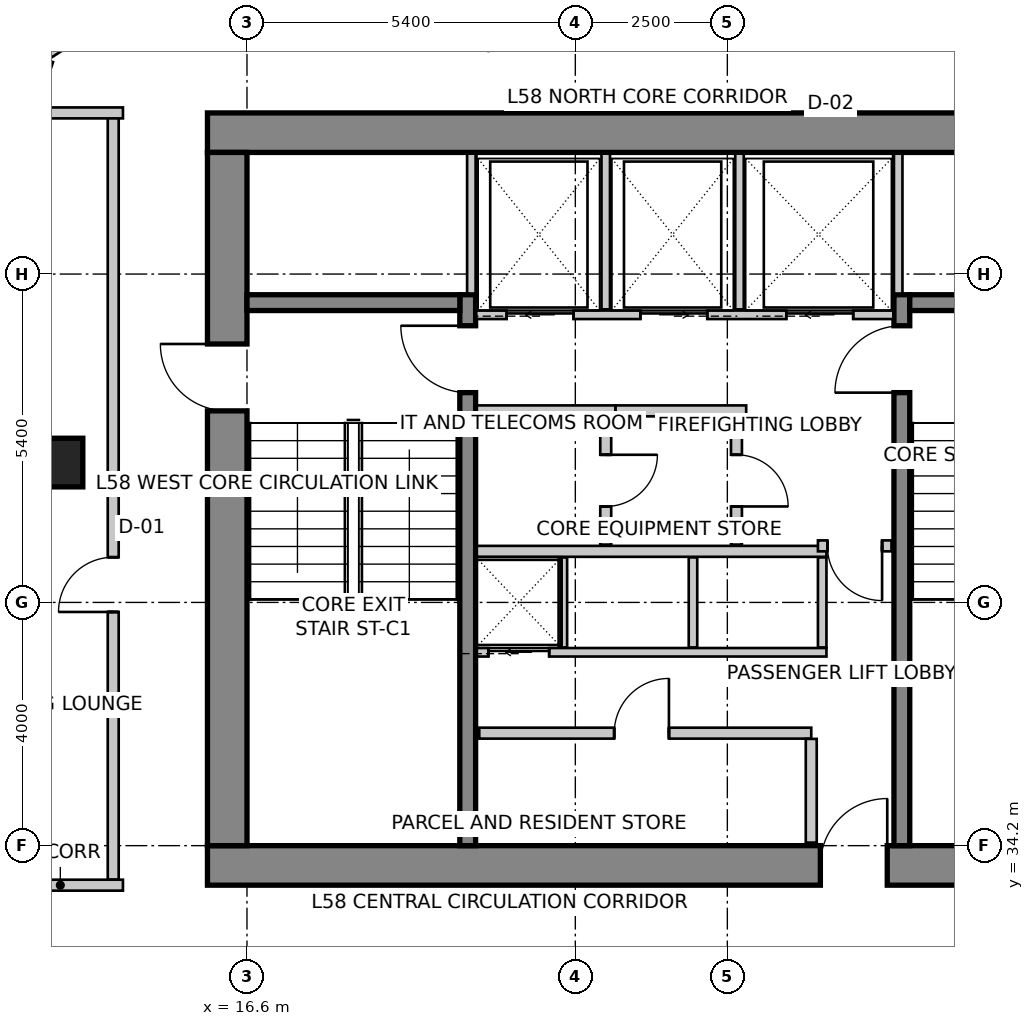
"""IFC4 building model, lengths in metres.
Left out: names, types, materials, properties, quantities, classifications, styles, units other than length and angle.
Written with IfcOpenShell. Run it as: python <this file> out.ifc"""

import sys

from ifc_helpers import new_model, si_unit, direction, frame, frame_2d, origin, origin_2d, place, context, subcontext, project, spatial, rectangle, extrude, source, transform, mapped, element, fill, save


model = new_model("IFC4")
c1 = context("Model", 3, precision=1e-05, world=origin(), true_north=direction((0.0, 1.0)))
c2 = subcontext(c1, "Body", "Model", "MODEL_VIEW")
j1 = project(units=[si_unit("LENGTHUNIT", "METRE"), si_unit("PLANEANGLEUNIT", "RADIAN")], contexts=[c1])
p1 = place(None, origin())
s1 = spatial("IfcSite", under=j1, at=p1, CompositionType="ELEMENT")
p2 = place(p1, origin())
s2 = spatial("IfcBuilding", under=s1, at=p2, CompositionType="ELEMENT")
p3 = place(p2, frame((0.0, 0.0, 228.9)))
s3 = spatial("IfcBuildingStorey", under=s2, at=p3, CompositionType="ELEMENT", Elevation=228.9)
p4 = place(p3, frame((15.95, 45.925, 0.0), z_axis=(0.0, 0.0, 1.0), x_axis=(1.0, 0.0, 0.0)))
e1 = element("IfcWall", 1, at=p4, inside=s3, PredefinedType="SHEAR", context=c2, shape_type="SweptSolid", body=[
    extrude(rectangle(XDim=15.7, YDim=0.65, at=frame_2d((7.85, 0.0))), origin(), (0.0, 0.0, 1.0), 3.5),
])
p5 = place(p3, frame((15.95, 33.875, 0.0), z_axis=(0.0, 0.0, 1.0), x_axis=(1.0, 0.0, 0.0)))
e2 = element("IfcWall", 2, at=p5, inside=s3, PredefinedType="SHEAR", context=c2, shape_type="SweptSolid", body=[
    extrude(rectangle(XDim=15.7, YDim=0.65, at=frame_2d((7.85, 0.0))), origin(), (0.0, 0.0, 1.0), 3.5),
])
m1 = source(origin(), c2, "Body", "SweptSolid", [
    extrude(rectangle(XDim=1.1, YDim=2.15, at=frame_2d((0.55, 1.075))), frame((0.0, 0.335, 0.0), z_axis=(0.0, -1.0, 0.0), x_axis=(1.0, 0.0, 0.0)), (0.0, 0.0, 1.0), 0.67),
])
p6 = place(p5, frame((10.08, 0.0, 0.0)))
e3 = element("IfcOpeningElement", 3, at=p6, cuts=e2, PredefinedType="OPENING", context=c2, shape_type="MappedRepresentation", body=[
    mapped(m1, transform((0.0, 0.0, 0.0), scale=1.0)),
])
p7 = place(p3, frame((16.275, 34.2, 0.0), z_axis=(0.0, 0.0, 1.0), x_axis=(0.0, 1.0, 0.0)))
e4 = element("IfcWall", 4, at=p7, inside=s3, PredefinedType="SHEAR", context=c2, shape_type="SweptSolid", body=[
    extrude(rectangle(XDim=11.4, YDim=0.65, at=frame_2d((5.7, 0.0))), origin(), (0.0, 0.0, 1.0), 3.5),
])
p8 = place(p7, frame((7.15, 0.0, 0.0)))
e5 = element("IfcOpeningElement", 5, at=p8, cuts=e4, PredefinedType="OPENING", context=c2, shape_type="MappedRepresentation", body=[
    mapped(m1, transform((0.0, 0.0, 0.0), scale=1.0)),
])
p9 = place(p3, frame((20.23, 34.2, 0.0), z_axis=(0.0, 0.0, 1.0), x_axis=(0.0, 1.0, 0.0)))
e6 = element("IfcWall", 6, at=p9, inside=s3, PredefinedType="SHEAR", context=c2, shape_type="SweptSolid", body=[
    extrude(rectangle(XDim=9.06, YDim=0.26, at=frame_2d((4.53, 0.0))), origin(), (0.0, 0.0, 1.0), 3.5),
])
m2 = source(origin(), c2, "Body", "SweptSolid", [
    extrude(rectangle(XDim=1.1, YDim=2.15, at=frame_2d((0.55, 1.075))), frame((0.0, 0.14, 0.0), z_axis=(0.0, -1.0, 0.0), x_axis=(1.0, 0.0, 0.0)), (0.0, 0.0, 1.0), 0.28),
])
p10 = place(p9, frame((7.45, 0.0, 0.0)))
e7 = element("IfcOpeningElement", 7, at=p10, cuts=e6, PredefinedType="OPENING", context=c2, shape_type="MappedRepresentation", body=[
    mapped(m2, transform((0.0, 0.0, 0.0), scale=1.0)),
])
p11 = place(p3, frame((27.37, 34.2, 0.0), z_axis=(0.0, 0.0, 1.0), x_axis=(0.0, 1.0, 0.0)))
e8 = element("IfcWall", 8, at=p11, inside=s3, PredefinedType="SHEAR", context=c2, shape_type="SweptSolid", body=[
    extrude(rectangle(XDim=9.06, YDim=0.26, at=frame_2d((4.53, 0.0))), origin(), (0.0, 0.0, 1.0), 3.5),
])
p12 = place(p11, frame((7.45, 0.0, 0.0)))
e9 = element("IfcOpeningElement", 9, at=p12, cuts=e8, PredefinedType="OPENING", context=c2, shape_type="MappedRepresentation", body=[
    mapped(m2, transform((0.0, 0.0, 0.0), scale=1.0)),
])
for number, where, z_axis, x_axis in (
    (10, (16.6, 43.13, 0.0), (0.0, 0.0, 1.0), (1.0, 0.0, 0.0)),
    (11, (27.5, 43.13, 0.0), (0.0, 0.0, 1.0), (1.0, 0.0, 0.0)),
):
    element("IfcWall", number, at=place(p3, frame(where, z_axis=z_axis, x_axis=x_axis)), inside=s3, PredefinedType="SHEAR", context=c2, shape_type="SweptSolid", body=[
        extrude(rectangle(XDim=3.5, YDim=0.26, at=frame_2d((1.75, 0.0))), origin(), (0.0, 0.0, 1.0), 3.5),
    ])
m3 = source(origin(), c2, "Body", "SweptSolid", [
    extrude(rectangle(XDim=0.8, YDim=0.8, at=origin_2d()), origin(), (0.0, 0.0, 1.0), 3.5),
])
p13 = place(p3, frame((13.5, 40.5, 0.0), z_axis=(0.0, 0.0, 1.0), x_axis=(1.0, 0.0, 0.0)))
e12 = element("IfcColumn", 12, at=p13, inside=s3, PredefinedType="COLUMN", context=c2, shape_type="MappedRepresentation", body=[
    mapped(m3, transform((0.0, 0.0, 0.0), scale=1.0)),
])
p14 = place(p3, frame((27.652, 30.892, 0.0), z_axis=(0.0, 0.0, 1.0), x_axis=(0.707106781187, 0.707106781187, 0.0)))
e13 = element("IfcWall", 13, at=p14, inside=s3, PredefinedType="SOLIDWALL", context=c2, shape_type="SweptSolid", body=[
    extrude(rectangle(XDim=2.907, YDim=0.3, at=frame_2d((1.454, 0.0))), origin(), (0.0, 0.0, 1.0), 3.25),
])
p15 = place(p3, frame((21.874, 52.742, 0.0), z_axis=(0.0, 0.0, 1.0), x_axis=(-0.84365659959, -0.536883173482, 0.0)))
e14 = element("IfcWall", 14, at=p15, inside=s3, PredefinedType="SOLIDWALL", context=c2, shape_type="SweptSolid", body=[
    extrude(rectangle(XDim=10.283, YDim=0.3, at=frame_2d((5.142, 0.0))), origin(), (0.0, 0.0, 1.0), 3.25),
])
m4 = source(origin(), c2, "Body", "SweptSolid", [
    extrude(rectangle(XDim=2.1, YDim=2.0, at=frame_2d((1.05, 1.0))), frame((0.0, 0.16, 0.0), z_axis=(0.0, -1.0, 0.0), x_axis=(1.0, 0.0, 0.0)), (0.0, 0.0, 1.0), 0.32),
])
p16 = place(p15, frame((3.457, 0.0, 0.85)))
e15 = element("IfcOpeningElement", 15, at=p16, cuts=e14, PredefinedType="OPENING", context=c2, shape_type="MappedRepresentation", body=[
    mapped(m4, transform((0.0, 0.0, 0.0), scale=1.0)),
])
p17 = place(p3, frame((13.269, 47.134, 0.0), z_axis=(0.0, 0.0, 1.0), x_axis=(-0.319920776449, -0.947444297464, 0.0)))
e16 = element("IfcWall", 16, at=p17, inside=s3, PredefinedType="SOLIDWALL", context=c2, shape_type="SweptSolid", body=[
    extrude(rectangle(XDim=16.133, YDim=0.3, at=frame_2d((8.067, 0.0))), origin(), (0.0, 0.0, 1.0), 3.25),
])
m5 = source(origin(), c2, "Body", "SweptSolid", [
    extrude(rectangle(XDim=2.4, YDim=2.2, at=frame_2d((1.2, 1.1))), frame((0.0, 0.16, 0.0), z_axis=(0.0, -1.0, 0.0), x_axis=(1.0, 0.0, 0.0)), (0.0, 0.0, 1.0), 0.32),
])
p18 = place(p17, frame((2.363, 0.0, 0.85)))
e17 = element("IfcOpeningElement", 17, at=p18, cuts=e16, PredefinedType="OPENING", context=c2, shape_type="MappedRepresentation", body=[
    mapped(m5, transform((0.0, 0.0, 0.0), scale=1.0)),
])
p19 = place(p17, frame((7.41, 0.0, 0.85)))
e18 = element("IfcOpeningElement", 18, at=p19, cuts=e16, PredefinedType="OPENING", context=c2, shape_type="MappedRepresentation", body=[
    mapped(m4, transform((0.0, 0.0, 0.0), scale=1.0)),
])
p20 = place(p17, frame((12.157, 0.0, 0.85)))
e19 = element("IfcOpeningElement", 19, at=p20, cuts=e16, PredefinedType="OPENING", context=c2, shape_type="MappedRepresentation", body=[
    mapped(m5, transform((0.0, 0.0, 0.0), scale=1.0)),
])
p21 = place(p3, frame((20.37, 42.93, 0.0), z_axis=(0.0, 0.0, 1.0), x_axis=(1.0, 0.0, 0.0)))
e20 = element("IfcWall", 20, at=p21, inside=s3, PredefinedType="SOLIDWALL", context=c2, shape_type="SweptSolid", body=[
    extrude(rectangle(XDim=6.86, YDim=0.14, at=frame_2d((3.43, 0.0))), origin(), (0.0, 0.0, 1.0), 3.25),
])
m6 = source(origin(), c2, "Body", "SweptSolid", [
    extrude(rectangle(XDim=1.1, YDim=2.15, at=frame_2d((0.55, 1.075))), frame((0.0, 0.08, 0.0), z_axis=(0.0, -1.0, 0.0), x_axis=(1.0, 0.0, 0.0)), (0.0, 0.0, 1.0), 0.16),
])
p22 = place(p21, frame((0.5, 0.0, 0.0)))
e21 = element("IfcOpeningElement", 21, at=p22, cuts=e20, PredefinedType="OPENING", context=c2, shape_type="MappedRepresentation", body=[
    mapped(m6, transform((0.0, 0.0, 0.0), scale=1.0)),
])
p23 = place(p21, frame((2.7, 0.0, 0.0)))
e22 = element("IfcOpeningElement", 22, at=p23, cuts=e20, PredefinedType="OPENING", context=c2, shape_type="MappedRepresentation", body=[
    mapped(m6, transform((0.0, 0.0, 0.0), scale=1.0)),
])
p24 = place(p21, frame((5.1, 0.0, 0.0)))
e23 = element("IfcOpeningElement", 23, at=p24, cuts=e20, PredefinedType="OPENING", context=c2, shape_type="MappedRepresentation", body=[
    mapped(m6, transform((0.0, 0.0, 0.0), scale=1.0)),
])
for number, where, z_axis, x_axis in (
    (24, (20.29, 43.28, 0.0), (0.0, 0.0, 1.0), (0.0, 1.0, 0.0)),
    (25, (27.31, 43.28, 0.0), (0.0, 0.0, 1.0), (0.0, 1.0, 0.0)),
):
    element("IfcWall", number, at=place(p3, frame(where, z_axis=z_axis, x_axis=x_axis)), inside=s3, PredefinedType="SOLIDWALL", context=c2, shape_type="SweptSolid", body=[
        extrude(rectangle(XDim=2.3, YDim=0.14, at=frame_2d((1.15, 0.0))), origin(), (0.0, 0.0, 1.0), 3.25),
    ])
for number, where, z_axis, x_axis in (
    (26, (22.5, 43.02, 0.0), (0.0, 0.0, 1.0), (0.0, 1.0, 0.0)),
    (27, (24.7, 43.02, 0.0), (0.0, 0.0, 1.0), (0.0, 1.0, 0.0)),
):
    element("IfcWall", number, at=place(p3, frame(where, z_axis=z_axis, x_axis=x_axis)), inside=s3, PredefinedType="SOLIDWALL", context=c2, shape_type="SweptSolid", body=[
        extrude(rectangle(XDim=2.56, YDim=0.14, at=frame_2d((1.28, 0.0))), origin(), (0.0, 0.0, 1.0), 3.25),
    ])
p25 = place(p3, frame((20.38, 37.38, 0.0), z_axis=(0.0, 0.0, 1.0), x_axis=(1.0, 0.0, 0.0)))
e28 = element("IfcWall", 28, at=p25, inside=s3, PredefinedType="SOLIDWALL", context=c2, shape_type="SweptSolid", body=[
    extrude(rectangle(XDim=5.75, YDim=0.14, at=frame_2d((2.875, 0.0))), origin(), (0.0, 0.0, 1.0), 3.25),
])
m7 = source(origin(), c2, "Body", "SweptSolid", [
    extrude(rectangle(XDim=1.0, YDim=2.15, at=frame_2d((0.5, 1.075))), frame((0.0, 0.08, 0.0), z_axis=(0.0, -1.0, 0.0), x_axis=(1.0, 0.0, 0.0)), (0.0, 0.0, 1.0), 0.16),
])
p26 = place(p25, frame((0.19, 0.0, 0.0)))
e29 = element("IfcOpeningElement", 29, at=p26, cuts=e28, PredefinedType="OPENING", context=c2, shape_type="MappedRepresentation", body=[
    mapped(m7, transform((0.0, 0.0, 0.0), scale=1.0)),
])
p27 = place(p3, frame((20.38, 39.04, 0.0), z_axis=(0.0, 0.0, 1.0), x_axis=(1.0, 0.0, 0.0)))
e30 = element("IfcWall", 30, at=p27, inside=s3, PredefinedType="SOLIDWALL", context=c2, shape_type="SweptSolid", body=[
    extrude(rectangle(XDim=5.75, YDim=0.18, at=frame_2d((2.875, 0.0))), origin(), (0.0, 0.0, 1.0), 3.25),
])
for number, where, z_axis, x_axis in (
    (31, (26.06, 37.46, 0.0), (0.0, 0.0, 1.0), (0.0, 1.0, 0.0)),
    (32, (21.795, 37.46, 0.0), (0.0, 0.0, 1.0), (0.0, 1.0, 0.0)),
    (33, (23.935, 37.46, 0.0), (0.0, 0.0, 1.0), (0.0, 1.0, 0.0)),
):
    element("IfcWall", number, at=place(p3, frame(where, z_axis=z_axis, x_axis=x_axis)), inside=s3, PredefinedType="SOLIDWALL", context=c2, shape_type="SweptSolid", body=[
        extrude(rectangle(XDim=1.48, YDim=0.14, at=frame_2d((0.74, 0.0))), origin(), (0.0, 0.0, 1.0), 3.25),
    ])
p28 = place(p3, frame((22.66, 41.35, 0.0), z_axis=(0.0, 0.0, 1.0), x_axis=(-1.0, 0.0, 0.0)))
e34 = element("IfcWall", 34, at=p28, inside=s3, PredefinedType="PARTITIONING", context=c2, shape_type="SweptSolid", body=[
    extrude(rectangle(XDim=2.28, YDim=0.18, at=frame_2d((1.14, 0.0))), origin(), (0.0, 0.0, 1.0), 3.25),
])
p29 = place(p3, frame((24.81, 41.35, 0.0), z_axis=(0.0, 0.0, 1.0), x_axis=(-1.0, 0.0, 0.0)))
e35 = element("IfcWall", 35, at=p29, inside=s3, PredefinedType="PARTITIONING", context=c2, shape_type="SweptSolid", body=[
    extrude(rectangle(XDim=2.148, YDim=0.18, at=frame_2d((1.074, 0.0))), origin(), (0.0, 0.0, 1.0), 3.25),
])
p30 = place(p3, frame((22.5, 41.256, 0.0), z_axis=(0.0, 0.0, 1.0), x_axis=(0.0, -1.0, 0.0)))
e36 = element("IfcWall", 36, at=p30, inside=s3, PredefinedType="PARTITIONING", context=c2, shape_type="SweptSolid", body=[
    extrude(rectangle(XDim=2.106, YDim=0.18, at=frame_2d((1.053, 0.0))), origin(), (0.0, 0.0, 1.0), 3.25),
])
m8 = source(origin(), c2, "Body", "SweptSolid", [
    extrude(rectangle(XDim=0.85, YDim=2.15, at=frame_2d((0.425, 1.075))), frame((0.0, 0.1, 0.0), z_axis=(0.0, -1.0, 0.0), x_axis=(1.0, 0.0, 0.0)), (0.0, 0.0, 1.0), 0.2),
])
p31 = place(p30, frame((0.628, 0.0, 0.0)))
e37 = element("IfcOpeningElement", 37, at=p31, cuts=e36, PredefinedType="OPENING", context=c2, shape_type="MappedRepresentation", body=[
    mapped(m8, transform((0.0, 0.0, 0.0), scale=1.0)),
])
p32 = place(p3, frame((24.65, 41.256, 0.0), z_axis=(0.0, 0.0, 1.0), x_axis=(0.0, -1.0, 0.0)))
e38 = element("IfcWall", 38, at=p32, inside=s3, PredefinedType="PARTITIONING", context=c2, shape_type="SweptSolid", body=[
    extrude(rectangle(XDim=2.106, YDim=0.18, at=frame_2d((1.053, 0.0))), origin(), (0.0, 0.0, 1.0), 3.25),
])
p33 = place(p32, frame((0.628, 0.0, 0.0)))
e39 = element("IfcOpeningElement", 39, at=p33, cuts=e38, PredefinedType="OPENING", context=c2, shape_type="MappedRepresentation", body=[
    mapped(m8, transform((0.0, 0.0, 0.0), scale=1.0)),
])
p34 = place(p3, frame((27.2, 39.13, 0.0), z_axis=(0.0, 0.0, 1.0), x_axis=(-1.0, 0.0, 0.0)))
e40 = element("IfcWall", 40, at=p34, inside=s3, PredefinedType="PARTITIONING", context=c2, shape_type="SweptSolid", body=[
    extrude(rectangle(XDim=1.21, YDim=0.18, at=frame_2d((0.605, 0.0))), origin(), (0.0, 0.0, 1.0), 3.25),
])
m9 = source(origin(), c2, "Body", "SweptSolid", [
    extrude(rectangle(XDim=0.9, YDim=2.15, at=frame_2d((0.45, 1.075))), frame((0.0, 0.1, 0.0), z_axis=(0.0, -1.0, 0.0), x_axis=(1.0, 0.0, 0.0)), (0.0, 0.0, 1.0), 0.2),
])
p35 = place(p34, frame((0.155, 0.0, 0.0)))
e41 = element("IfcOpeningElement", 41, at=p35, cuts=e40, PredefinedType="OPENING", context=c2, shape_type="MappedRepresentation", body=[
    mapped(m9, transform((0.0, 0.0, 0.0), scale=1.0)),
])
p36 = place(p3, frame((20.42, 36.05, 0.0), z_axis=(0.0, 0.0, 1.0), x_axis=(1.0, 0.0, 0.0)))
e42 = element("IfcWall", 42, at=p36, inside=s3, PredefinedType="PARTITIONING", context=c2, shape_type="SweptSolid", body=[
    extrude(rectangle(XDim=5.46, YDim=0.18, at=frame_2d((2.73, 0.0))), origin(), (0.0, 0.0, 1.0), 3.25),
])
p37 = place(p36, frame((2.219, 0.0, 0.0)))
e43 = element("IfcOpeningElement", 43, at=p37, cuts=e42, PredefinedType="OPENING", context=c2, shape_type="MappedRepresentation", body=[
    mapped(m9, transform((0.0, 0.0, 0.0), scale=1.0)),
])
p38 = place(p3, frame((25.88, 35.956, 0.0), z_axis=(0.0, 0.0, 1.0), x_axis=(0.0, -1.0, 0.0)))
e44 = element("IfcWall", 44, at=p38, inside=s3, PredefinedType="PARTITIONING", context=c2, shape_type="SweptSolid", body=[
    extrude(rectangle(XDim=1.706, YDim=0.18, at=frame_2d((0.853, 0.0))), origin(), (0.0, 0.0, 1.0), 2.542),
])
p39 = place(p3, frame((12.5, 33.55, 0.0), z_axis=(0.0, 0.0, 1.0), x_axis=(1.0, 0.0, 0.0)))
e45 = element("IfcWall", 45, at=p39, inside=s3, PredefinedType="PARTITIONING", context=c2, shape_type="SweptSolid", body=[
    extrude(rectangle(XDim=2.06, YDim=0.18, at=frame_2d((1.03, 0.0))), origin(), (0.0, 0.0, 1.0), 3.25),
])
p40 = place(p3, frame((14.4, 33.644, 0.0), z_axis=(0.0, 0.0, 1.0), x_axis=(0.0, 1.0, 0.0)))
e46 = element("IfcWall", 46, at=p40, inside=s3, PredefinedType="PARTITIONING", context=c2, shape_type="SweptSolid", body=[
    extrude(rectangle(XDim=12.606, YDim=0.18, at=frame_2d((6.303, 0.0))), origin(), (0.0, 0.0, 1.0), 3.25),
])
p41 = place(p40, frame((4.399, 0.0, 0.0)))
e47 = element("IfcOpeningElement", 47, at=p41, cuts=e46, PredefinedType="OPENING", context=c2, shape_type="MappedRepresentation", body=[
    mapped(m9, transform((0.0, 0.0, 0.0), scale=1.0)),
])
p42 = place(p3, frame((14.56, 46.25, 0.0), z_axis=(0.0, 0.0, 1.0), x_axis=(-1.0, 0.0, 0.0)))
e48 = element("IfcWall", 48, at=p42, inside=s3, PredefinedType="PARTITIONING", context=c2, shape_type="SweptSolid", body=[
    extrude(rectangle(XDim=1.469, YDim=0.18, at=frame_2d((0.734, 0.0))), origin(), (0.0, 0.0, 1.0), 3.25),
])
m10 = source(origin(), c2, "Body", "SweptSolid", [
    extrude(rectangle(XDim=1.1, YDim=2.15, at=frame_2d((0.55, 1.075))), frame((0.0, 0.025, 0.0), z_axis=(0.0, -1.0, 0.0), x_axis=(1.0, 0.0, 0.0)), (0.0, 0.0, 1.0), 0.05),
])
p43 = place(p22, origin())
e49 = element("IfcDoor", 49, at=p43, inside=s3, OperationType="SLIDING_TO_LEFT", PredefinedType="DOOR", context=c2, shape_type="MappedRepresentation", body=[
    mapped(m10, transform((0.0, 0.0, 0.0), scale=1.0)),
])
fill(e21, e49)
p44 = place(p23, origin())
e50 = element("IfcDoor", 50, at=p44, inside=s3, OperationType="SLIDING_TO_RIGHT", PredefinedType="DOOR", context=c2, shape_type="MappedRepresentation", body=[
    mapped(m10, transform((0.0, 0.0, 0.0), scale=1.0)),
])
fill(e22, e50)
m11 = source(origin(), c2, "Body", "SweptSolid", [
    extrude(rectangle(XDim=1.1, YDim=2.15, at=frame_2d((0.55, 1.075))), frame((0.0, 0.025, 0.0), z_axis=(0.0, -1.0, 0.0), x_axis=(1.0, 0.0, 0.0)), (0.0, 0.0, 1.0), 0.05),
])
p45 = place(p24, origin())
e51 = element("IfcDoor", 51, at=p45, inside=s3, OperationType="SLIDING_TO_LEFT", PredefinedType="DOOR", context=c2, shape_type="MappedRepresentation", body=[
    mapped(m11, transform((0.0, 0.0, 0.0), scale=1.0)),
])
fill(e23, e51)
m12 = source(origin(), c2, "Body", "SweptSolid", [
    extrude(rectangle(XDim=1.0, YDim=2.15, at=frame_2d((0.5, 1.075))), frame((0.0, 0.025, 0.0), z_axis=(0.0, -1.0, 0.0), x_axis=(1.0, 0.0, 0.0)), (0.0, 0.0, 1.0), 0.05),
])
p46 = place(p26, origin())
e52 = element("IfcDoor", 52, at=p46, inside=s3, OperationType="SLIDING_TO_LEFT", PredefinedType="DOOR", context=c2, shape_type="MappedRepresentation", body=[
    mapped(m12, transform((0.0, 0.0, 0.0), scale=1.0)),
])
fill(e29, e52)
m13 = source(origin(), c2, "Body", "SweptSolid", [
    extrude(rectangle(XDim=1.1, YDim=2.15, at=frame_2d((0.55, 1.075))), frame((0.0, 0.025, 0.0), z_axis=(0.0, -1.0, 0.0), x_axis=(1.0, 0.0, 0.0)), (0.0, 0.0, 1.0), 0.05),
])
p47 = place(p10, origin())
e53 = element("IfcDoor", 53, at=p47, inside=s3, OperationType="SINGLE_SWING_RIGHT", PredefinedType="DOOR", context=c2, shape_type="MappedRepresentation", body=[
    mapped(m13, transform((0.0, 0.0, 0.0), scale=1.0)),
])
fill(e7, e53)
p48 = place(p12, origin())
e54 = element("IfcDoor", 54, at=p48, inside=s3, OperationType="SINGLE_SWING_LEFT", PredefinedType="DOOR", context=c2, shape_type="MappedRepresentation", body=[
    mapped(m13, transform((0.0, 0.0, 0.0), scale=1.0)),
])
fill(e9, e54)
p49 = place(p8, origin())
e55 = element("IfcDoor", 55, at=p49, inside=s3, OperationType="SINGLE_SWING_RIGHT", PredefinedType="DOOR", context=c2, shape_type="MappedRepresentation", body=[
    mapped(m13, transform((0.0, 0.0, 0.0), scale=1.0)),
])
fill(e5, e55)
p50 = place(p6, origin())
e56 = element("IfcDoor", 56, at=p50, inside=s3, OperationType="SINGLE_SWING_RIGHT", PredefinedType="DOOR", context=c2, shape_type="MappedRepresentation", body=[
    mapped(m13, transform((0.0, 0.0, 0.0), scale=1.0)),
])
fill(e3, e56)
m14 = source(origin(), c2, "Body", "SweptSolid", [
    extrude(rectangle(XDim=0.85, YDim=2.15, at=frame_2d((0.425, 1.075))), frame((0.0, 0.025, 0.0), z_axis=(0.0, -1.0, 0.0), x_axis=(1.0, 0.0, 0.0)), (0.0, 0.0, 1.0), 0.05),
])
p51 = place(p31, origin())
e57 = element("IfcDoor", 57, at=p51, inside=s3, OperationType="SINGLE_SWING_LEFT", PredefinedType="DOOR", context=c2, shape_type="MappedRepresentation", body=[
    mapped(m14, transform((0.0, 0.0, 0.0), scale=1.0)),
])
fill(e37, e57)
p52 = place(p33, origin())
e58 = element("IfcDoor", 58, at=p52, inside=s3, OperationType="SINGLE_SWING_RIGHT", PredefinedType="DOOR", context=c2, shape_type="MappedRepresentation", body=[
    mapped(m14, transform((0.0, 0.0, 0.0), scale=1.0)),
])
fill(e39, e58)
m15 = source(origin(), c2, "Body", "SweptSolid", [
    extrude(rectangle(XDim=0.9, YDim=2.15, at=frame_2d((0.45, 1.075))), frame((0.0, 0.025, 0.0), z_axis=(0.0, -1.0, 0.0), x_axis=(1.0, 0.0, 0.0)), (0.0, 0.0, 1.0), 0.05),
])
p53 = place(p35, origin())
e59 = element("IfcDoor", 59, at=p53, inside=s3, OperationType="SINGLE_SWING_LEFT", PredefinedType="DOOR", context=c2, shape_type="MappedRepresentation", body=[
    mapped(m15, transform((0.0, 0.0, 0.0), scale=1.0)),
])
fill(e41, e59)
p54 = place(p37, origin())
e60 = element("IfcDoor", 60, at=p54, inside=s3, OperationType="SINGLE_SWING_RIGHT", PredefinedType="DOOR", context=c2, shape_type="MappedRepresentation", body=[
    mapped(m15, transform((0.0, 0.0, 0.0), scale=1.0)),
])
fill(e43, e60)
m16 = source(origin(), c2, "Body", "SweptSolid", [
    extrude(rectangle(XDim=0.9, YDim=2.15, at=frame_2d((0.45, 1.075))), frame((0.0, 0.025, 0.0), z_axis=(0.0, -1.0, 0.0), x_axis=(1.0, 0.0, 0.0)), (0.0, 0.0, 1.0), 0.05),
])
p55 = place(p41, origin())
e61 = element("IfcDoor", 61, at=p55, inside=s3, OperationType="SINGLE_SWING_LEFT", PredefinedType="DOOR", context=c2, shape_type="MappedRepresentation", body=[
    mapped(m16, transform((0.0, 0.0, 0.0), scale=1.0)),
])
fill(e47, e61)
save(model, sys.argv[1])
